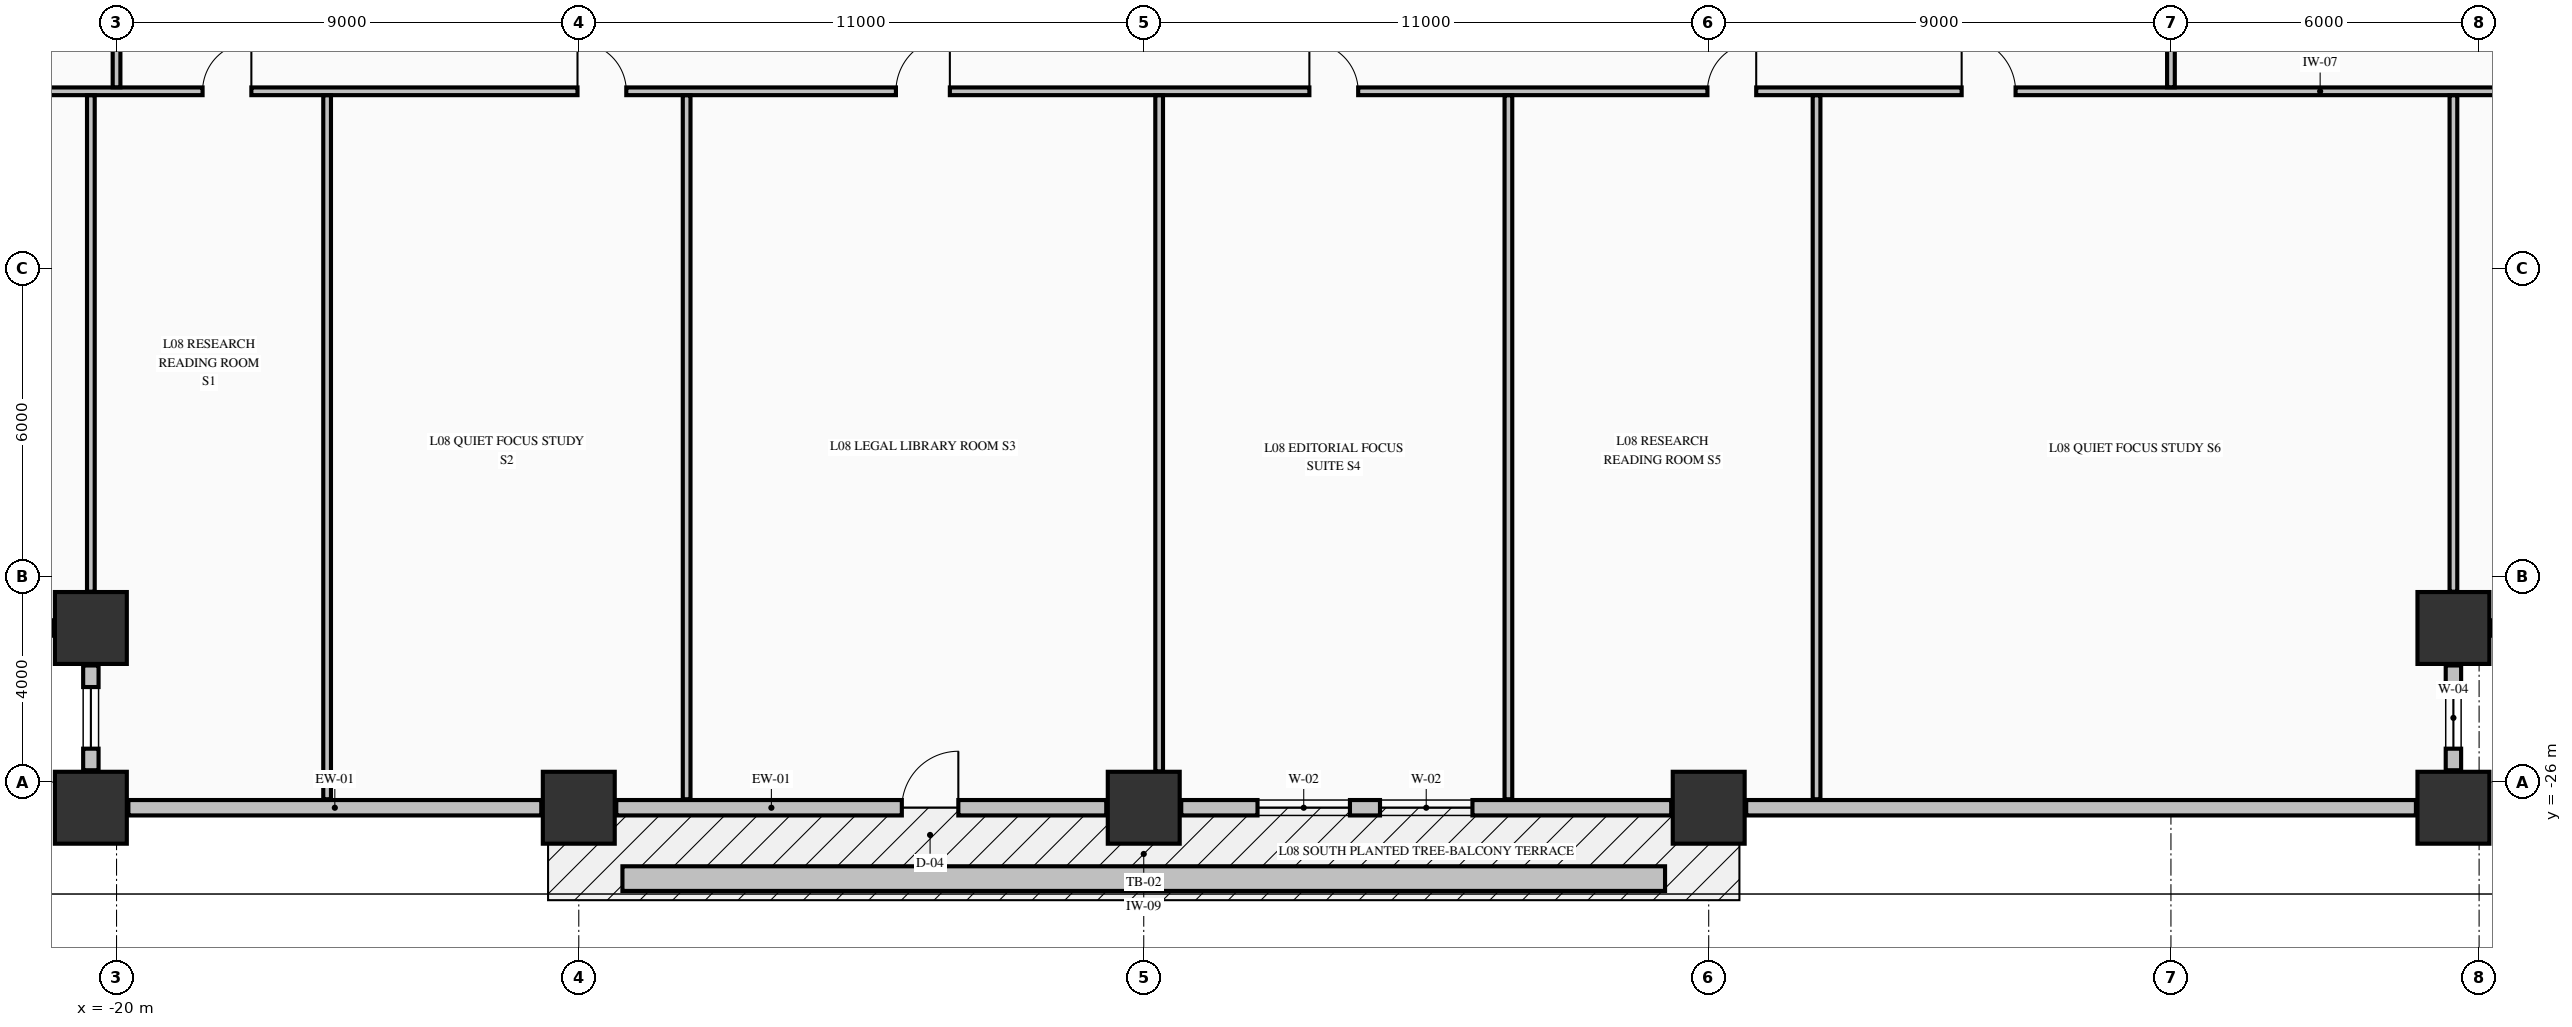
"""IFC4 building model, lengths in metres.
Left out: names, types, materials, properties, quantities, classifications, styles, units other than length and angle.
Written with IfcOpenShell. Run it as: python <this file> out.ifc"""

import sys

from ifc_helpers import new_model, si_unit, direction, frame, frame_2d, origin, origin_2d, place, context, subcontext, project, spatial, rectangle, extrude, element, fill, save


model = new_model("IFC4")
c1 = context("Model", 3, precision=1e-05, world=origin(), true_north=direction((0.0, 1.0)))
c2 = subcontext(c1, "Body", "Model", "MODEL_VIEW")
j1 = project(units=[si_unit("LENGTHUNIT", "METRE"), si_unit("PLANEANGLEUNIT", "RADIAN")], contexts=[c1])
p1 = place(None, origin())
s1 = spatial("IfcSite", under=j1, at=p1, CompositionType="ELEMENT")
p2 = place(p1, origin())
s2 = spatial("IfcBuilding", under=s1, at=p2, CompositionType="ELEMENT")
p3 = place(p2, frame((0.0, 0.0, 37.91)))
s3 = spatial("IfcBuildingStorey", under=s2, at=p3, CompositionType="ELEMENT", Elevation=37.91)
for number, where, z_axis, x_axis in (
    (1, (-20.5, -26.5, -0.25), (0.0, 0.0, 1.0), (1.0, 0.0, 0.0)),
    (2, (-11.0, -26.5, -0.25), (0.0, 0.0, 1.0), (1.0, 0.0, 0.0)),
    (3, (0.0, -26.5, -0.25), (0.0, 0.0, 1.0), (1.0, 0.0, 0.0)),
    (4, (11.0, -26.5, -0.25), (0.0, 0.0, 1.0), (1.0, 0.0, 0.0)),
    (5, (25.5, -26.5, -0.25), (0.0, 0.0, 1.0), (1.0, 0.0, 0.0)),
    (6, (-20.5, -23.0, -0.25), (0.0, 0.0, 1.0), (1.0, 0.0, 0.0)),
    (7, (25.5, -23.0, -0.25), (0.0, 0.0, 1.0), (1.0, 0.0, 0.0)),
):
    element("IfcColumn", number, at=place(p3, frame(where, z_axis=z_axis, x_axis=x_axis)), inside=s3, PredefinedType="COLUMN", context=c2, shape_type="SweptSolid", body=[
        extrude(rectangle(XDim=1.4, YDim=1.4, at=origin_2d()), origin(), (0.0, 0.0, 1.0), 3.57),
    ])
p4 = place(p3, frame((25.5, -25.77, 0.0), z_axis=(0.0, 0.0, 1.0), x_axis=(0.0, 1.0, 0.0)))
e8 = element("IfcWall", 8, at=p4, inside=s3, PredefinedType="STANDARD", context=c2, shape_type="SweptSolid", body=[
    extrude(rectangle(XDim=2.04, YDim=0.3, at=frame_2d((1.02, 0.0))), origin(), (0.0, 0.0, 1.0), 2.712),
])
p5 = place(p4, frame((0.42, 0.0, 0.82)))
e9 = element("IfcOpeningElement", 9, at=p5, cuts=e8, PredefinedType="OPENING", context=c2, shape_type="SweptSolid", body=[
    extrude(rectangle(XDim=1.2, YDim=1.65, at=frame_2d((0.6, 0.825))), frame((0.0, 0.16, 0.0), z_axis=(0.0, -1.0, 0.0), x_axis=(1.0, 0.0, 0.0)), (0.0, 0.0, 1.0), 0.32),
])
p6 = place(p3, frame((26.23, -23.0, 0.0), z_axis=(0.0, 0.0, 1.0), x_axis=(1.0, 0.0, 0.0)))
e10 = element("IfcWall", 10, at=p6, inside=s3, PredefinedType="STANDARD", context=c2, shape_type="SweptSolid", body=[
    extrude(rectangle(XDim=2.04, YDim=0.3, at=frame_2d((1.02, 0.0))), origin(), (0.0, 0.0, 1.0), 2.712),
])
p7 = place(p6, frame((0.42, 0.0, 0.82)))
e11 = element("IfcOpeningElement", 11, at=p7, cuts=e10, PredefinedType="OPENING", context=c2, shape_type="SweptSolid", body=[
    extrude(rectangle(XDim=1.2, YDim=1.65, at=frame_2d((0.6, 0.825))), frame((0.0, 0.16, 0.0), z_axis=(0.0, -1.0, 0.0), x_axis=(1.0, 0.0, 0.0)), (0.0, 0.0, 1.0), 0.32),
])
p8 = place(p3, frame((-23.27, -23.0, 0.0), z_axis=(0.0, 0.0, 1.0), x_axis=(1.0, 0.0, 0.0)))
e12 = element("IfcWall", 12, at=p8, inside=s3, PredefinedType="STANDARD", context=c2, shape_type="SweptSolid", body=[
    extrude(rectangle(XDim=2.04, YDim=0.3, at=frame_2d((1.02, 0.0))), origin(), (0.0, 0.0, 1.0), 2.712),
])
p9 = place(p8, frame((0.42, 0.0, 0.82)))
e13 = element("IfcOpeningElement", 13, at=p9, cuts=e12, PredefinedType="OPENING", context=c2, shape_type="SweptSolid", body=[
    extrude(rectangle(XDim=1.2, YDim=1.65, at=frame_2d((0.6, 0.825))), frame((0.0, 0.16, 0.0), z_axis=(0.0, -1.0, 0.0), x_axis=(1.0, 0.0, 0.0)), (0.0, 0.0, 1.0), 0.32),
])
p10 = place(p3, frame((-20.5, -23.73, 0.0), z_axis=(0.0, 0.0, 1.0), x_axis=(0.0, -1.0, 0.0)))
e14 = element("IfcWall", 14, at=p10, inside=s3, PredefinedType="STANDARD", context=c2, shape_type="SweptSolid", body=[
    extrude(rectangle(XDim=2.04, YDim=0.3, at=frame_2d((1.02, 0.0))), origin(), (0.0, 0.0, 1.0), 2.712),
])
p11 = place(p10, frame((0.42, 0.0, 0.82)))
e15 = element("IfcOpeningElement", 15, at=p11, cuts=e14, PredefinedType="OPENING", context=c2, shape_type="SweptSolid", body=[
    extrude(rectangle(XDim=1.2, YDim=1.65, at=frame_2d((0.6, 0.825))), frame((0.0, 0.16, 0.0), z_axis=(0.0, -1.0, 0.0), x_axis=(1.0, 0.0, 0.0)), (0.0, 0.0, 1.0), 0.32),
])
p12 = place(p3, frame((-19.77, -26.5, 0.0), z_axis=(0.0, 0.0, 1.0), x_axis=(1.0, 0.0, 0.0)))
e16 = element("IfcWall", 16, at=p12, inside=s3, PredefinedType="STANDARD", context=c2, shape_type="SweptSolid", body=[
    extrude(rectangle(XDim=8.04, YDim=0.3, at=frame_2d((4.02, 0.0))), origin(), (0.0, 0.0, 1.0), 2.712),
])
p13 = place(p3, frame((-10.27, -26.5, 0.0), z_axis=(0.0, 0.0, 1.0), x_axis=(1.0, 0.0, 0.0)))
e17 = element("IfcWall", 17, at=p13, inside=s3, PredefinedType="STANDARD", context=c2, shape_type="SweptSolid", body=[
    extrude(rectangle(XDim=9.54, YDim=0.3, at=frame_2d((4.77, 0.0))), origin(), (0.0, 0.0, 1.0), 2.712),
])
p14 = place(p13, frame((5.56, 0.0, 0.0)))
e18 = element("IfcOpeningElement", 18, at=p14, cuts=e17, PredefinedType="OPENING", context=c2, shape_type="SweptSolid", body=[
    extrude(rectangle(XDim=1.1, YDim=2.15, at=frame_2d((0.55, 1.075))), frame((0.0, 0.16, 0.0), z_axis=(0.0, -1.0, 0.0), x_axis=(1.0, 0.0, 0.0)), (0.0, 0.0, 1.0), 0.32),
])
p15 = place(p3, frame((0.73, -26.5, 0.0), z_axis=(0.0, 0.0, 1.0), x_axis=(1.0, 0.0, 0.0)))
e19 = element("IfcWall", 19, at=p15, inside=s3, PredefinedType="STANDARD", context=c2, shape_type="SweptSolid", body=[
    extrude(rectangle(XDim=9.54, YDim=0.3, at=frame_2d((4.77, 0.0))), origin(), (0.0, 0.0, 1.0), 2.712),
])
p16 = place(p15, frame((1.485, 0.0, 0.78)))
e20 = element("IfcOpeningElement", 20, at=p16, cuts=e19, PredefinedType="OPENING", context=c2, shape_type="SweptSolid", body=[
    extrude(rectangle(XDim=1.8, YDim=1.72, at=frame_2d((0.9, 0.86))), frame((0.0, 0.16, 0.0), z_axis=(0.0, -1.0, 0.0), x_axis=(1.0, 0.0, 0.0)), (0.0, 0.0, 1.0), 0.32),
])
p17 = place(p15, frame((3.87, 0.0, 0.78)))
e21 = element("IfcOpeningElement", 21, at=p17, cuts=e19, PredefinedType="OPENING", context=c2, shape_type="SweptSolid", body=[
    extrude(rectangle(XDim=1.8, YDim=1.72, at=frame_2d((0.9, 0.86))), frame((0.0, 0.16, 0.0), z_axis=(0.0, -1.0, 0.0), x_axis=(1.0, 0.0, 0.0)), (0.0, 0.0, 1.0), 0.32),
])
p18 = place(p3, frame((11.73, -26.5, 0.0), z_axis=(0.0, 0.0, 1.0), x_axis=(1.0, 0.0, 0.0)))
e22 = element("IfcWall", 22, at=p18, inside=s3, PredefinedType="STANDARD", context=c2, shape_type="SweptSolid", body=[
    extrude(rectangle(XDim=13.04, YDim=0.3, at=frame_2d((6.52, 0.0))), origin(), (0.0, 0.0, 1.0), 2.712),
])
p19 = place(p3, frame((-23.835, -12.55, 0.0), z_axis=(0.0, 0.0, 1.0), x_axis=(1.0, 0.0, 0.0)))
e23 = element("IfcWall", 23, at=p19, inside=s3, PredefinedType="PARTITIONING", context=c2, shape_type="SweptSolid", body=[
    extrude(rectangle(XDim=52.67, YDim=0.15, at=frame_2d((26.335, 0.0))), origin(), (0.0, 0.0, 1.0), 3.32),
])
p20 = place(p19, frame((5.51, 0.0, 0.0)))
e24 = element("IfcOpeningElement", 24, at=p20, cuts=e23, PredefinedType="OPENING", context=c2, shape_type="SweptSolid", body=[
    extrude(rectangle(XDim=0.95, YDim=2.15, at=frame_2d((0.475, 1.075))), frame((0.0, 0.085, 0.0), z_axis=(0.0, -1.0, 0.0), x_axis=(1.0, 0.0, 0.0)), (0.0, 0.0, 1.0), 0.17),
])
p21 = place(p19, frame((12.81, 0.0, 0.0)))
e25 = element("IfcOpeningElement", 25, at=p21, cuts=e23, PredefinedType="OPENING", context=c2, shape_type="SweptSolid", body=[
    extrude(rectangle(XDim=0.95, YDim=2.15, at=frame_2d((0.475, 1.075))), frame((0.0, 0.085, 0.0), z_axis=(0.0, -1.0, 0.0), x_axis=(1.0, 0.0, 0.0)), (0.0, 0.0, 1.0), 0.17),
])
p22 = place(p19, frame((19.01, 0.0, 0.0)))
e26 = element("IfcOpeningElement", 26, at=p22, cuts=e23, PredefinedType="OPENING", context=c2, shape_type="SweptSolid", body=[
    extrude(rectangle(XDim=1.05, YDim=2.15, at=frame_2d((0.525, 1.075))), frame((0.0, 0.085, 0.0), z_axis=(0.0, -1.0, 0.0), x_axis=(1.0, 0.0, 0.0)), (0.0, 0.0, 1.0), 0.17),
])
p23 = place(p19, frame((27.06, 0.0, 0.0)))
e27 = element("IfcOpeningElement", 27, at=p23, cuts=e23, PredefinedType="OPENING", context=c2, shape_type="SweptSolid", body=[
    extrude(rectangle(XDim=0.95, YDim=2.15, at=frame_2d((0.475, 1.075))), frame((0.0, 0.085, 0.0), z_axis=(0.0, -1.0, 0.0), x_axis=(1.0, 0.0, 0.0)), (0.0, 0.0, 1.0), 0.17),
])
p24 = place(p19, frame((34.81, 0.0, 0.0)))
e28 = element("IfcOpeningElement", 28, at=p24, cuts=e23, PredefinedType="OPENING", context=c2, shape_type="SweptSolid", body=[
    extrude(rectangle(XDim=0.95, YDim=2.15, at=frame_2d((0.475, 1.075))), frame((0.0, 0.085, 0.0), z_axis=(0.0, -1.0, 0.0), x_axis=(1.0, 0.0, 0.0)), (0.0, 0.0, 1.0), 0.17),
])
p25 = place(p19, frame((39.76, 0.0, 0.0)))
e29 = element("IfcOpeningElement", 29, at=p25, cuts=e23, PredefinedType="OPENING", context=c2, shape_type="SweptSolid", body=[
    extrude(rectangle(XDim=1.05, YDim=2.15, at=frame_2d((0.525, 1.075))), frame((0.0, 0.085, 0.0), z_axis=(0.0, -1.0, 0.0), x_axis=(1.0, 0.0, 0.0)), (0.0, 0.0, 1.0), 0.17),
])
p26 = place(p3, frame((-20.5, -22.294, 0.0), z_axis=(0.0, 0.0, 1.0), x_axis=(0.0, 1.0, 0.0)))
e30 = element("IfcWall", 30, at=p26, inside=s3, PredefinedType="PARTITIONING", context=c2, shape_type="SweptSolid", body=[
    extrude(rectangle(XDim=9.666, YDim=0.15, at=frame_2d((4.833, 0.0))), origin(), (0.0, 0.0, 1.0), 3.32),
])
p27 = place(p3, frame((-20.0, -12.472, 0.0), z_axis=(0.0, 0.0, 1.0), x_axis=(0.0, 1.0, 0.0)))
e31 = element("IfcWall", 31, at=p27, inside=s3, PredefinedType="PARTITIONING", context=c2, shape_type="SweptSolid", body=[
    extrude(rectangle(XDim=1.916, YDim=0.15, at=frame_2d((0.958, 0.0))), origin(), (0.0, 0.0, 1.0), 3.32),
])
p28 = place(p27, frame((0.747, 0.0, 0.0)))
e32 = element("IfcOpeningElement", 32, at=p28, cuts=e31, PredefinedType="OPENING", context=c2, shape_type="SweptSolid", body=[
    extrude(rectangle(XDim=0.95, YDim=2.15, at=frame_2d((0.475, 1.075))), frame((0.0, 0.085, 0.0), z_axis=(0.0, -1.0, 0.0), x_axis=(1.0, 0.0, 0.0)), (0.0, 0.0, 1.0), 0.17),
])
for number, where, z_axis, x_axis in (
    (33, (-15.9, -26.335, 0.0), (0.0, 0.0, 1.0), (0.0, 1.0, 0.0)),
    (34, (-8.9, -26.335, 0.0), (0.0, 0.0, 1.0), (0.0, 1.0, 0.0)),
):
    element("IfcWall", number, at=place(p3, frame(where, z_axis=z_axis, x_axis=x_axis)), inside=s3, PredefinedType="PARTITIONING", context=c2, shape_type="SweptSolid", body=[
        extrude(rectangle(XDim=13.707, YDim=0.15, at=frame_2d((6.854, 0.0))), origin(), (0.0, 0.0, 1.0), 3.32),
    ])
p29 = place(p3, frame((0.3, -25.794, 0.0), z_axis=(0.0, 0.0, 1.0), x_axis=(0.0, 1.0, 0.0)))
e35 = element("IfcWall", 35, at=p29, inside=s3, PredefinedType="PARTITIONING", context=c2, shape_type="SweptSolid", body=[
    extrude(rectangle(XDim=13.166, YDim=0.15, at=frame_2d((6.583, 0.0))), origin(), (0.0, 0.0, 1.0), 2.66),
])
for number, where, z_axis, x_axis in (
    (36, (7.1, -26.335, 0.0), (0.0, 0.0, 1.0), (0.0, 1.0, 0.0)),
    (37, (13.1, -26.335, 0.0), (0.0, 0.0, 1.0), (0.0, 1.0, 0.0)),
):
    element("IfcWall", number, at=place(p3, frame(where, z_axis=z_axis, x_axis=x_axis)), inside=s3, PredefinedType="PARTITIONING", context=c2, shape_type="SweptSolid", body=[
        extrude(rectangle(XDim=13.707, YDim=0.15, at=frame_2d((6.854, 0.0))), origin(), (0.0, 0.0, 1.0), 3.32),
    ])
p30 = place(p3, frame((20.0, -12.472, 0.0), z_axis=(0.0, 0.0, 1.0), x_axis=(0.0, 1.0, 0.0)))
e38 = element("IfcWall", 38, at=p30, inside=s3, PredefinedType="PARTITIONING", context=c2, shape_type="SweptSolid", body=[
    extrude(rectangle(XDim=1.916, YDim=0.15, at=frame_2d((0.958, 0.0))), origin(), (0.0, 0.0, 1.0), 2.66),
])
p31 = place(p30, frame((0.747, 0.0, 0.0)))
e39 = element("IfcOpeningElement", 39, at=p31, cuts=e38, PredefinedType="OPENING", context=c2, shape_type="SweptSolid", body=[
    extrude(rectangle(XDim=0.95, YDim=2.15, at=frame_2d((0.475, 1.075))), frame((0.0, 0.085, 0.0), z_axis=(0.0, -1.0, 0.0), x_axis=(1.0, 0.0, 0.0)), (0.0, 0.0, 1.0), 0.17),
])
p32 = place(p3, frame((25.5, -22.294, 0.0), z_axis=(0.0, 0.0, 1.0), x_axis=(0.0, 1.0, 0.0)))
e40 = element("IfcWall", 40, at=p32, inside=s3, PredefinedType="PARTITIONING", context=c2, shape_type="SweptSolid", body=[
    extrude(rectangle(XDim=9.666, YDim=0.15, at=frame_2d((4.833, 0.0))), origin(), (0.0, 0.0, 1.0), 3.32),
])
p33 = place(p3, frame((-10.15, -27.88, -0.04), z_axis=(0.0, 0.0, 1.0), x_axis=(1.0, 0.0, 0.0)))
e41 = element("IfcWall", 41, at=p33, inside=s3, PredefinedType="PARAPET", context=c2, shape_type="SweptSolid", body=[
    extrude(rectangle(XDim=20.3, YDim=0.48, at=frame_2d((10.15, 0.0))), origin(), (0.0, 0.0, 1.0), 0.52),
])
p34 = place(p5, origin())
e42 = element("IfcWindow", 42, at=p34, inside=s3, PartitioningType="SINGLE_PANEL", PredefinedType="WINDOW", context=c2, shape_type="SweptSolid", body=[
    extrude(rectangle(XDim=1.2, YDim=1.65, at=frame_2d((0.6, 0.825))), frame((0.0, 0.03, 0.0), z_axis=(0.0, -1.0, 0.0), x_axis=(1.0, 0.0, 0.0)), (0.0, 0.0, 1.0), 0.06),
])
fill(e9, e42)
p35 = place(p11, origin())
e43 = element("IfcWindow", 43, at=p35, inside=s3, PartitioningType="SINGLE_PANEL", PredefinedType="WINDOW", context=c2, shape_type="SweptSolid", body=[
    extrude(rectangle(XDim=1.2, YDim=1.65, at=frame_2d((0.6, 0.825))), frame((0.0, 0.03, 0.0), z_axis=(0.0, -1.0, 0.0), x_axis=(1.0, 0.0, 0.0)), (0.0, 0.0, 1.0), 0.06),
])
fill(e15, e43)
p36 = place(p14, origin())
e44 = element("IfcDoor", 44, at=p36, inside=s3, OperationType="SINGLE_SWING_RIGHT", PredefinedType="DOOR", context=c2, shape_type="SweptSolid", body=[
    extrude(rectangle(XDim=1.1, YDim=2.15, at=frame_2d((0.55, 1.075))), frame((0.0, 0.025, 0.0), z_axis=(0.0, -1.0, 0.0), x_axis=(1.0, 0.0, 0.0)), (0.0, 0.0, 1.0), 0.05),
])
fill(e18, e44)
p37 = place(p16, origin())
e45 = element("IfcWindow", 45, at=p37, inside=s3, PartitioningType="SINGLE_PANEL", PredefinedType="WINDOW", context=c2, shape_type="SweptSolid", body=[
    extrude(rectangle(XDim=1.8, YDim=1.72, at=frame_2d((0.9, 0.86))), frame((0.0, 0.03, 0.0), z_axis=(0.0, -1.0, 0.0), x_axis=(1.0, 0.0, 0.0)), (0.0, 0.0, 1.0), 0.06),
])
fill(e20, e45)
p38 = place(p17, origin())
e46 = element("IfcWindow", 46, at=p38, inside=s3, PartitioningType="SINGLE_PANEL", PredefinedType="WINDOW", context=c2, shape_type="SweptSolid", body=[
    extrude(rectangle(XDim=1.8, YDim=1.72, at=frame_2d((0.9, 0.86))), frame((0.0, 0.03, 0.0), z_axis=(0.0, -1.0, 0.0), x_axis=(1.0, 0.0, 0.0)), (0.0, 0.0, 1.0), 0.06),
])
fill(e21, e46)
p39 = place(p20, origin())
e47 = element("IfcDoor", 47, at=p39, inside=s3, OperationType="SINGLE_SWING_RIGHT", PredefinedType="DOOR", context=c2, shape_type="SweptSolid", body=[
    extrude(rectangle(XDim=0.95, YDim=2.15, at=frame_2d((0.475, 1.075))), frame((0.0, 0.025, 0.0), z_axis=(0.0, -1.0, 0.0), x_axis=(1.0, 0.0, 0.0)), (0.0, 0.0, 1.0), 0.05),
])
fill(e24, e47)
p40 = place(p21, origin())
e48 = element("IfcDoor", 48, at=p40, inside=s3, OperationType="SINGLE_SWING_LEFT", PredefinedType="DOOR", context=c2, shape_type="SweptSolid", body=[
    extrude(rectangle(XDim=0.95, YDim=2.15, at=frame_2d((0.475, 1.075))), frame((0.0, 0.025, 0.0), z_axis=(0.0, -1.0, 0.0), x_axis=(1.0, 0.0, 0.0)), (0.0, 0.0, 1.0), 0.05),
])
fill(e25, e48)
p41 = place(p22, origin())
e49 = element("IfcDoor", 49, at=p41, inside=s3, OperationType="SINGLE_SWING_RIGHT", PredefinedType="DOOR", context=c2, shape_type="SweptSolid", body=[
    extrude(rectangle(XDim=1.05, YDim=2.15, at=frame_2d((0.525, 1.075))), frame((0.0, 0.025, 0.0), z_axis=(0.0, -1.0, 0.0), x_axis=(1.0, 0.0, 0.0)), (0.0, 0.0, 1.0), 0.05),
])
fill(e26, e49)
p42 = place(p23, origin())
e50 = element("IfcDoor", 50, at=p42, inside=s3, OperationType="SINGLE_SWING_LEFT", PredefinedType="DOOR", context=c2, shape_type="SweptSolid", body=[
    extrude(rectangle(XDim=0.95, YDim=2.15, at=frame_2d((0.475, 1.075))), frame((0.0, 0.025, 0.0), z_axis=(0.0, -1.0, 0.0), x_axis=(1.0, 0.0, 0.0)), (0.0, 0.0, 1.0), 0.05),
])
fill(e27, e50)
p43 = place(p24, origin())
e51 = element("IfcDoor", 51, at=p43, inside=s3, OperationType="SINGLE_SWING_RIGHT", PredefinedType="DOOR", context=c2, shape_type="SweptSolid", body=[
    extrude(rectangle(XDim=0.95, YDim=2.15, at=frame_2d((0.475, 1.075))), frame((0.0, 0.025, 0.0), z_axis=(0.0, -1.0, 0.0), x_axis=(1.0, 0.0, 0.0)), (0.0, 0.0, 1.0), 0.05),
])
fill(e28, e51)
p44 = place(p25, origin())
e52 = element("IfcDoor", 52, at=p44, inside=s3, OperationType="SINGLE_SWING_LEFT", PredefinedType="DOOR", context=c2, shape_type="SweptSolid", body=[
    extrude(rectangle(XDim=1.05, YDim=2.15, at=frame_2d((0.525, 1.075))), frame((0.0, 0.025, 0.0), z_axis=(0.0, -1.0, 0.0), x_axis=(1.0, 0.0, 0.0)), (0.0, 0.0, 1.0), 0.05),
])
fill(e29, e52)
save(model, sys.argv[1])
